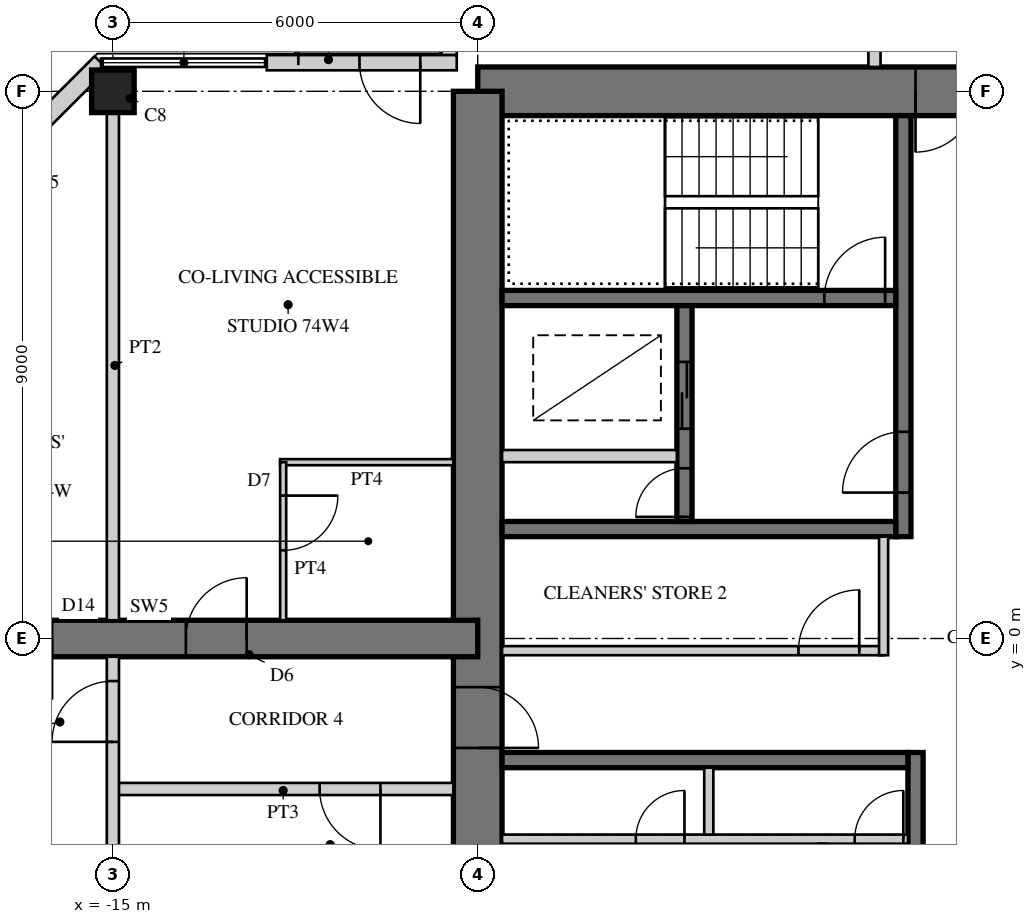
"""IFC4 building model, lengths in metres.
Left out: names, types, materials, properties, quantities, classifications, styles, units other than length and angle.
Written with IfcOpenShell. Run it as: python <this file> out.ifc"""

import sys

from ifc_helpers import new_model, si_unit, direction, frame, frame_2d, origin, origin_2d, place, context, subcontext, project, spatial, rectangle, hollow_rectangle, extrude, element, fill, save


model = new_model("IFC4")
c1 = context("Model", 3, precision=1e-05, world=origin(), true_north=direction((0.0, 1.0)))
c2 = subcontext(c1, "Body", "Model", "MODEL_VIEW")
j1 = project(units=[si_unit("LENGTHUNIT", "METRE"), si_unit("PLANEANGLEUNIT", "RADIAN")], contexts=[c1])
p1 = place(None, origin())
s1 = spatial("IfcSite", under=j1, at=p1, CompositionType="ELEMENT")
p2 = place(p1, origin())
s2 = spatial("IfcBuilding", under=s1, at=p2, CompositionType="ELEMENT")
p3 = place(p2, frame((0.0, 0.0, 284.9)))
s3 = spatial("IfcBuildingStorey", under=s2, at=p3, CompositionType="ELEMENT", Elevation=284.9)
p4 = place(p3, frame((9.0, 9.0, 0.0), z_axis=(0.0, 0.0, 1.0), x_axis=(-1.0, 0.0, 0.0)))
e1 = element("IfcWall", 1, at=p4, inside=s3, PredefinedType="SHEAR", context=c2, shape_type="SweptSolid", body=[
    extrude(rectangle(XDim=18.0, YDim=0.8, at=frame_2d((9.0, 0.0))), origin(), (0.0, 0.0, 1.0), 3.4),
])
p5 = place(p4, frame((9.8, 0.0, 0.0)))
e2 = element("IfcOpeningElement", 2, at=p5, cuts=e1, PredefinedType="OPENING", context=c2, shape_type="SweptSolid", body=[
    extrude(rectangle(XDim=1.0, YDim=2.4, at=frame_2d((0.5, 1.2))), frame((0.0, 0.41, 0.0), z_axis=(0.0, -1.0, 0.0), x_axis=(1.0, 0.0, 0.0)), (0.0, 0.0, 1.0), 0.82),
])
p6 = place(p3, frame((-9.0, 9.0, 0.0), z_axis=(0.0, 0.0, 1.0), x_axis=(0.0, -1.0, 0.0)))
e3 = element("IfcWall", 3, at=p6, inside=s3, PredefinedType="SHEAR", context=c2, shape_type="SweptSolid", body=[
    extrude(rectangle(XDim=18.0, YDim=0.8, at=frame_2d((9.0, 0.0))), origin(), (0.0, 0.0, 1.0), 3.4),
])
p7 = place(p6, frame((9.8, 0.0, 0.0)))
e4 = element("IfcOpeningElement", 4, at=p7, cuts=e3, PredefinedType="OPENING", context=c2, shape_type="SweptSolid", body=[
    extrude(rectangle(XDim=1.0, YDim=2.4, at=frame_2d((0.5, 1.2))), frame((0.0, 0.41, 0.0), z_axis=(0.0, -1.0, 0.0), x_axis=(1.0, 0.0, 0.0)), (0.0, 0.0, 1.0), 0.82),
])
p8 = place(p3, frame((-2.0, 1.675, 0.0), z_axis=(0.0, 0.0, 1.0), x_axis=(0.0, 1.0, 0.0)))
e5 = element("IfcWall", 5, at=p8, inside=s3, PredefinedType="SHEAR", context=c2, shape_type="SweptSolid", body=[
    extrude(rectangle(XDim=6.925, YDim=0.25, at=frame_2d((3.462, 0.0))), origin(), (0.0, 0.0, 1.0), 3.4),
])
p9 = place(p8, frame((0.725, 0.0, 0.0)))
e6 = element("IfcOpeningElement", 6, at=p9, cuts=e5, PredefinedType="OPENING", context=c2, shape_type="SweptSolid", body=[
    extrude(rectangle(XDim=1.0, YDim=2.1, at=frame_2d((0.5, 1.05))), frame((0.0, 0.135, 0.0), z_axis=(0.0, -1.0, 0.0), x_axis=(1.0, 0.0, 0.0)), (0.0, 0.0, 1.0), 0.27),
])
p10 = place(p3, frame((-2.125, 1.8, 0.0), z_axis=(0.0, 0.0, 1.0), x_axis=(-1.0, 0.0, 0.0)))
e7 = element("IfcWall", 7, at=p10, inside=s3, PredefinedType="SHEAR", context=c2, shape_type="SweptSolid", body=[
    extrude(rectangle(XDim=6.475, YDim=0.25, at=frame_2d((3.238, 0.0))), origin(), (0.0, 0.0, 1.0), 3.4),
])
p11 = place(p3, frame((-2.125, 5.6, 0.0), z_axis=(0.0, 0.0, 1.0), x_axis=(-1.0, 0.0, 0.0)))
e8 = element("IfcWall", 8, at=p11, inside=s3, PredefinedType="SHEAR", context=c2, shape_type="SweptSolid", body=[
    extrude(rectangle(XDim=6.475, YDim=0.25, at=frame_2d((3.238, 0.0))), origin(), (0.0, 0.0, 1.0), 3.4),
])
p12 = place(p11, frame((0.175, 0.0, 0.0)))
e9 = element("IfcOpeningElement", 9, at=p12, cuts=e8, PredefinedType="OPENING", context=c2, shape_type="SweptSolid", body=[
    extrude(rectangle(XDim=1.0, YDim=2.1, at=frame_2d((0.5, 1.05))), frame((0.0, 0.135, 0.0), z_axis=(0.0, -1.0, 0.0), x_axis=(1.0, 0.0, 0.0)), (0.0, 0.0, 1.0), 0.27),
])
p13 = place(p3, frame((-5.6, 1.925, 0.0), z_axis=(0.0, 0.0, 1.0), x_axis=(0.0, 1.0, 0.0)))
e10 = element("IfcWall", 10, at=p13, inside=s3, PredefinedType="SHEAR", context=c2, shape_type="SweptSolid", body=[
    extrude(rectangle(XDim=3.55, YDim=0.25, at=frame_2d((1.775, 0.0))), origin(), (0.0, 0.0, 1.0), 3.4),
])
p14 = place(p13, frame((1.525, 0.0, 0.0)))
e11 = element("IfcOpeningElement", 11, at=p14, cuts=e10, PredefinedType="OPENING", context=c2, shape_type="SweptSolid", body=[
    extrude(rectangle(XDim=1.1, YDim=2.2, at=frame_2d((0.55, 1.1))), frame((0.0, 0.135, 0.0), z_axis=(0.0, -1.0, 0.0), x_axis=(1.0, 0.0, 0.0)), (0.0, 0.0, 1.0), 0.27),
])
p15 = place(p13, frame((0.075, 0.0, 0.0)))
e12 = element("IfcOpeningElement", 12, at=p15, cuts=e10, PredefinedType="OPENING", context=c2, shape_type="SweptSolid", body=[
    extrude(rectangle(XDim=0.8, YDim=2.1, at=frame_2d((0.4, 1.05))), frame((0.0, 0.135, 0.0), z_axis=(0.0, -1.0, 0.0), x_axis=(1.0, 0.0, 0.0)), (0.0, 0.0, 1.0), 0.27),
])
p16 = place(p3, frame((-5.725, 3.0, 0.0), z_axis=(0.0, 0.0, 1.0), x_axis=(-1.0, 0.0, 0.0)))
e13 = element("IfcWall", 13, at=p16, inside=s3, PredefinedType="PARTITIONING", context=c2, shape_type="SweptSolid", body=[
    extrude(rectangle(XDim=2.875, YDim=0.2, at=frame_2d((1.438, 0.0))), origin(), (0.0, 0.0, 1.0), 3.4),
])
p17 = place(p3, frame((-1.8, -1.875, 0.0), z_axis=(0.0, 0.0, 1.0), x_axis=(0.0, -1.0, 0.0)))
e14 = element("IfcWall", 14, at=p17, inside=s3, PredefinedType="SHEAR", context=c2, shape_type="SweptSolid", body=[
    extrude(rectangle(XDim=6.725, YDim=0.25, at=frame_2d((3.363, 0.0))), origin(), (0.0, 0.0, 1.0), 3.4),
])
p18 = place(p17, frame((1.875, 0.0, 0.0)))
e15 = element("IfcOpeningElement", 15, at=p18, cuts=e14, PredefinedType="OPENING", context=c2, shape_type="SweptSolid", body=[
    extrude(rectangle(XDim=1.6, YDim=2.4, at=frame_2d((0.8, 1.2))), frame((0.0, 0.135, 0.0), z_axis=(0.0, -1.0, 0.0), x_axis=(1.0, 0.0, 0.0)), (0.0, 0.0, 1.0), 0.27),
])
p19 = place(p3, frame((-1.925, -2.0, 0.0), z_axis=(0.0, 0.0, 1.0), x_axis=(-1.0, 0.0, 0.0)))
e16 = element("IfcWall", 16, at=p19, inside=s3, PredefinedType="SHEAR", context=c2, shape_type="SweptSolid", body=[
    extrude(rectangle(XDim=6.675, YDim=0.25, at=frame_2d((3.337, 0.0))), origin(), (0.0, 0.0, 1.0), 3.4),
])
p20 = place(p3, frame((-1.925, -3.3, 0.0), z_axis=(0.0, 0.0, 1.0), x_axis=(-1.0, 0.0, 0.0)))
e17 = element("IfcWall", 17, at=p20, inside=s3, PredefinedType="PARTITIONING", context=c2, shape_type="SweptSolid", body=[
    extrude(rectangle(XDim=6.675, YDim=0.15, at=frame_2d((3.337, 0.0))), origin(), (0.0, 0.0, 1.0), 3.4),
])
p21 = place(p20, frame((0.075, 0.0, 0.0)))
e18 = element("IfcOpeningElement", 18, at=p21, cuts=e17, PredefinedType="OPENING", context=c2, shape_type="SweptSolid", body=[
    extrude(rectangle(XDim=0.8, YDim=2.1, at=frame_2d((0.4, 1.05))), frame((0.0, 0.085, 0.0), z_axis=(0.0, -1.0, 0.0), x_axis=(1.0, 0.0, 0.0)), (0.0, 0.0, 1.0), 0.17),
])
p22 = place(p20, frame((3.675, 0.0, 0.0)))
e19 = element("IfcOpeningElement", 19, at=p22, cuts=e17, PredefinedType="OPENING", context=c2, shape_type="SweptSolid", body=[
    extrude(rectangle(XDim=0.8, YDim=2.1, at=frame_2d((0.4, 1.05))), frame((0.0, 0.085, 0.0), z_axis=(0.0, -1.0, 0.0), x_axis=(1.0, 0.0, 0.0)), (0.0, 0.0, 1.0), 0.17),
])
p23 = place(p3, frame((-5.2, -2.125, 0.0), z_axis=(0.0, 0.0, 1.0), x_axis=(0.0, -1.0, 0.0)))
e20 = element("IfcWall", 20, at=p23, inside=s3, PredefinedType="PARTITIONING", context=c2, shape_type="SweptSolid", body=[
    extrude(rectangle(XDim=1.1, YDim=0.15, at=frame_2d((0.55, 0.0))), origin(), (0.0, 0.0, 1.0), 3.4),
])
p24 = place(p3, frame((-9.0, 0.0, 0.0), z_axis=(0.0, 0.0, 1.0), x_axis=(-1.0, 0.0, 0.0)))
e21 = element("IfcWall", 21, at=p24, inside=s3, PredefinedType="SHEAR", context=c2, shape_type="SweptSolid", body=[
    extrude(rectangle(XDim=9.0, YDim=0.6, at=frame_2d((4.5, 0.0))), origin(), (0.0, 0.0, 1.0), 3.4),
])
p25 = place(p24, frame((3.8, 0.0, 0.0)))
e22 = element("IfcOpeningElement", 22, at=p25, cuts=e21, PredefinedType="OPENING", context=c2, shape_type="SweptSolid", body=[
    extrude(rectangle(XDim=1.0, YDim=2.15, at=frame_2d((0.5, 1.075))), frame((0.0, 0.31, 0.0), z_axis=(0.0, -1.0, 0.0), x_axis=(1.0, 0.0, 0.0)), (0.0, 0.0, 1.0), 0.62),
])
p26 = place(p24, frame((7.0, 0.0, 0.0)))
e23 = element("IfcOpeningElement", 23, at=p26, cuts=e21, PredefinedType="OPENING", context=c2, shape_type="SweptSolid", body=[
    extrude(rectangle(XDim=1.0, YDim=2.2, at=frame_2d((0.5, 1.1))), frame((0.0, 0.31, 0.0), z_axis=(0.0, -1.0, 0.0), x_axis=(1.0, 0.0, 0.0)), (0.0, 0.0, 1.0), 0.62),
])
p27 = place(p3, frame((-15.0, 9.0, 0.0), z_axis=(0.0, 0.0, 1.0), x_axis=(1.0, 0.0, 0.0)))
e24 = element("IfcColumn", 24, at=p27, inside=s3, PredefinedType="COLUMN", context=c2, shape_type="SweptSolid", body=[
    extrude(rectangle(XDim=0.7, YDim=0.7, at=origin_2d()), origin(), (0.0, 0.0, 1.0), 3.4),
])
p28 = place(p3, frame((-9.47, 12.47, 0.0), z_axis=(0.0, 0.0, 1.0), x_axis=(0.0, -1.0, 0.0)))
e25 = element("IfcWall", 25, at=p28, inside=s3, PredefinedType="SOLIDWALL", context=c2, shape_type="SweptSolid", body=[
    extrude(rectangle(XDim=2.875, YDim=0.25, at=frame_2d((1.438, 0.0))), origin(), (0.0, 0.0, 1.0), 3.2),
])
p29 = place(p28, frame((0.6, 0.0, 0.0)))
e26 = element("IfcOpeningElement", 26, at=p29, cuts=e25, PredefinedType="OPENING", context=c2, shape_type="SweptSolid", body=[
    extrude(rectangle(XDim=1.0, YDim=2.2, at=frame_2d((0.5, 1.1))), frame((0.0, 0.135, 0.0), z_axis=(0.0, -1.0, 0.0), x_axis=(1.0, 0.0, 0.0)), (0.0, 0.0, 1.0), 0.27),
])
p30 = place(p3, frame((-9.345, 9.47, 0.0), z_axis=(0.0, 0.0, 1.0), x_axis=(-1.0, 0.0, 0.0)))
e27 = element("IfcWall", 27, at=p30, inside=s3, PredefinedType="SOLIDWALL", context=c2, shape_type="SweptSolid", body=[
    extrude(rectangle(XDim=3.125, YDim=0.25, at=frame_2d((1.562, 0.0))), origin(), (0.0, 0.0, 1.0), 3.2),
])
p31 = place(p30, frame((0.6, 0.0, 0.0)))
e28 = element("IfcOpeningElement", 28, at=p31, cuts=e27, PredefinedType="OPENING", context=c2, shape_type="SweptSolid", body=[
    extrude(rectangle(XDim=1.0, YDim=2.2, at=frame_2d((0.5, 1.1))), frame((0.0, 0.135, 0.0), z_axis=(0.0, -1.0, 0.0), x_axis=(1.0, 0.0, 0.0)), (0.0, 0.0, 1.0), 0.27),
])
p32 = place(p3, frame((-15.195, 9.47, 0.0), z_axis=(0.0, 0.0, 1.0), x_axis=(-0.707106781187, -0.707106781187, 0.0)))
e29 = element("IfcWall", 29, at=p32, inside=s3, PredefinedType="SOLIDWALL", context=c2, shape_type="SweptSolid", body=[
    extrude(rectangle(XDim=4.632, YDim=0.3, at=frame_2d((2.316, 0.0))), origin(), (0.0, 0.0, 1.0), 3.2),
])
p33 = place(p32, frame((1.866, 0.0, 0.3)))
e30 = element("IfcOpeningElement", 30, at=p33, cuts=e29, PredefinedType="OPENING", context=c2, shape_type="SweptSolid", body=[
    extrude(rectangle(XDim=0.9, YDim=2.4, at=frame_2d((0.45, 1.2))), frame((0.0, 0.16, 0.0), z_axis=(0.0, -1.0, 0.0), x_axis=(1.0, 0.0, 0.0)), (0.0, 0.0, 1.0), 0.32),
])
p34 = place(p3, frame((-2.325, -0.2, 0.0), z_axis=(0.0, 0.0, 1.0), x_axis=(-1.0, 0.0, 0.0)))
e31 = element("IfcWall", 31, at=p34, inside=s3, PredefinedType="PARTITIONING", context=c2, shape_type="SweptSolid", body=[
    extrude(rectangle(XDim=6.275, YDim=0.15, at=frame_2d((3.138, 0.0))), origin(), (0.0, 0.0, 1.0), 3.2),
])
p35 = place(p34, frame((0.4, 0.0, 0.0)))
e32 = element("IfcOpeningElement", 32, at=p35, cuts=e31, PredefinedType="OPENING", context=c2, shape_type="SweptSolid", body=[
    extrude(rectangle(XDim=1.0, YDim=2.1, at=frame_2d((0.5, 1.05))), frame((0.0, 0.085, 0.0), z_axis=(0.0, -1.0, 0.0), x_axis=(1.0, 0.0, 0.0)), (0.0, 0.0, 1.0), 0.17),
])
p36 = place(p3, frame((-2.325, 1.675, 0.0), z_axis=(0.0, 0.0, 1.0), x_axis=(0.0, -1.0, 0.0)))
e33 = element("IfcWall", 33, at=p36, inside=s3, PredefinedType="PARTITIONING", context=c2, shape_type="SweptSolid", body=[
    extrude(rectangle(XDim=1.95, YDim=0.15, at=frame_2d((0.975, 0.0))), origin(), (0.0, 0.0, 1.0), 3.2),
])
p37 = place(p3, frame((-2.475, 9.4, 0.0), z_axis=(0.0, 0.0, 1.0), x_axis=(0.0, 1.0, 0.0)))
e34 = element("IfcWall", 34, at=p37, inside=s3, PredefinedType="SOLIDWALL", context=c2, shape_type="SweptSolid", body=[
    extrude(rectangle(XDim=5.6, YDim=0.2, at=frame_2d((2.8, 0.0))), origin(), (0.0, 0.0, 1.0), 3.2),
])
p38 = place(p37, frame((1.2, 0.0, 0.0)))
e35 = element("IfcOpeningElement", 35, at=p38, cuts=e34, PredefinedType="OPENING", context=c2, shape_type="SweptSolid", body=[
    extrude(rectangle(XDim=1.0, YDim=2.2, at=frame_2d((0.5, 1.1))), frame((0.0, 0.11, 0.0), z_axis=(0.0, -1.0, 0.0), x_axis=(1.0, 0.0, 0.0)), (0.0, 0.0, 1.0), 0.22),
])
p39 = place(p3, frame((-9.4, 2.9, 0.0), z_axis=(0.0, 0.0, 1.0), x_axis=(-1.0, 0.0, 0.0)))
e36 = element("IfcWall", 36, at=p39, inside=s3, PredefinedType="PARTITIONING", context=c2, shape_type="SweptSolid", body=[
    extrude(rectangle(XDim=2.85, YDim=0.1, at=frame_2d((1.425, 0.0))), origin(), (0.0, 0.0, 1.0), 3.2),
])
p40 = place(p3, frame((-12.2, 2.9, 0.0), z_axis=(0.0, 0.0, 1.0), x_axis=(0.0, -1.0, 0.0)))
e37 = element("IfcWall", 37, at=p40, inside=s3, PredefinedType="PARTITIONING", context=c2, shape_type="SweptSolid", body=[
    extrude(rectangle(XDim=2.6, YDim=0.1, at=frame_2d((1.3, 0.0))), origin(), (0.0, 0.0, 1.0), 3.2),
])
p41 = place(p40, frame((0.55, 0.0, 0.0)))
e38 = element("IfcOpeningElement", 38, at=p41, cuts=e37, PredefinedType="OPENING", context=c2, shape_type="SweptSolid", body=[
    extrude(rectangle(XDim=0.9, YDim=2.1, at=frame_2d((0.45, 1.05))), frame((0.0, 0.06, 0.0), z_axis=(0.0, -1.0, 0.0), x_axis=(1.0, 0.0, 0.0)), (0.0, 0.0, 1.0), 0.12),
])
p42 = place(p3, frame((-9.4, -2.475, 0.0), z_axis=(0.0, 0.0, 1.0), x_axis=(-1.0, 0.0, 0.0)))
e39 = element("IfcWall", 39, at=p42, inside=s3, PredefinedType="SOLIDWALL", context=c2, shape_type="SweptSolid", body=[
    extrude(rectangle(XDim=5.6, YDim=0.2, at=frame_2d((2.8, 0.0))), origin(), (0.0, 0.0, 1.0), 3.2),
])
p43 = place(p42, frame((1.2, 0.0, 0.0)))
e40 = element("IfcOpeningElement", 40, at=p43, cuts=e39, PredefinedType="OPENING", context=c2, shape_type="SweptSolid", body=[
    extrude(rectangle(XDim=1.0, YDim=2.2, at=frame_2d((0.5, 1.1))), frame((0.0, 0.11, 0.0), z_axis=(0.0, -1.0, 0.0), x_axis=(1.0, 0.0, 0.0)), (0.0, 0.0, 1.0), 0.22),
])
p44 = place(p3, frame((-15.0, 8.65, 0.0), z_axis=(0.0, 0.0, 1.0), x_axis=(0.0, -1.0, 0.0)))
e41 = element("IfcWall", 41, at=p44, inside=s3, PredefinedType="SOLIDWALL", context=c2, shape_type="SweptSolid", body=[
    extrude(rectangle(XDim=8.35, YDim=0.2, at=frame_2d((4.175, 0.0))), origin(), (0.0, 0.0, 1.0), 2.5),
])
p45 = place(p3, frame((-15.0, -0.3, 0.0), z_axis=(0.0, 0.0, 1.0), x_axis=(0.0, -1.0, 0.0)))
e42 = element("IfcWall", 42, at=p45, inside=s3, PredefinedType="SOLIDWALL", context=c2, shape_type="SweptSolid", body=[
    extrude(rectangle(XDim=8.35, YDim=0.2, at=frame_2d((4.175, 0.0))), origin(), (0.0, 0.0, 1.0), 2.5),
])
p46 = place(p45, frame((0.4, 0.0, 0.0)))
e43 = element("IfcOpeningElement", 43, at=p46, cuts=e42, PredefinedType="OPENING", context=c2, shape_type="SweptSolid", body=[
    extrude(rectangle(XDim=1.0, YDim=2.2, at=frame_2d((0.5, 1.1))), frame((0.0, 0.11, 0.0), z_axis=(0.0, -1.0, 0.0), x_axis=(1.0, 0.0, 0.0)), (0.0, 0.0, 1.0), 0.22),
])
p47 = place(p31, origin())
e44 = element("IfcDoor", 44, at=p47, inside=s3, OperationType="SINGLE_SWING_LEFT", PredefinedType="DOOR", context=c2, shape_type="SweptSolid", body=[
    extrude(hollow_rectangle(XDim=1.0, YDim=2.2, WallThickness=0.06, at=frame_2d((0.5, 1.1))), frame((0.0, 0.025, 0.0), z_axis=(0.0, -1.0, 0.0), x_axis=(1.0, 0.0, 0.0)), (0.0, 0.0, 1.0), 0.05),
    extrude(rectangle(XDim=0.879, YDim=2.079, at=frame_2d((0.5, 1.1))), frame((0.0, 0.025, 0.0), z_axis=(0.0, -1.0, 0.0), x_axis=(1.0, 0.0, 0.0)), (0.0, 0.0, 1.0), 0.05),
])
fill(e28, e44)
p48 = place(p35, frame((1.0, 0.0, 0.0), z_axis=(0.0, 0.0, 1.0), x_axis=(-1.0, 0.0, 0.0)))
e45 = element("IfcDoor", 45, at=p48, inside=s3, OperationType="SINGLE_SWING_RIGHT", PredefinedType="DOOR", context=c2, shape_type="SweptSolid", body=[
    extrude(rectangle(XDim=1.0, YDim=2.1, at=frame_2d((0.5, 1.05))), frame((0.0, 0.025, 0.0), z_axis=(0.0, -1.0, 0.0), x_axis=(1.0, 0.0, 0.0)), (0.0, 0.0, 1.0), 0.05),
])
fill(e32, e45)
p49 = place(p41, origin())
e46 = element("IfcDoor", 46, at=p49, inside=s3, OperationType="SINGLE_SWING_LEFT", PredefinedType="DOOR", context=c2, shape_type="SweptSolid", body=[
    extrude(rectangle(XDim=0.9, YDim=2.1, at=frame_2d((0.45, 1.05))), frame((0.0, 0.025, 0.0), z_axis=(0.0, -1.0, 0.0), x_axis=(1.0, 0.0, 0.0)), (0.0, 0.0, 1.0), 0.05),
])
fill(e38, e46)
p50 = place(p43, origin())
e47 = element("IfcDoor", 47, at=p50, inside=s3, OperationType="SINGLE_SWING_LEFT", PredefinedType="DOOR", context=c2, shape_type="SweptSolid", body=[
    extrude(rectangle(XDim=1.0, YDim=2.2, at=frame_2d((0.5, 1.1))), frame((0.0, 0.025, 0.0), z_axis=(0.0, -1.0, 0.0), x_axis=(1.0, 0.0, 0.0)), (0.0, 0.0, 1.0), 0.05),
])
fill(e40, e47)
p51 = place(p46, frame((1.0, 0.0, 0.0), z_axis=(0.0, 0.0, 1.0), x_axis=(-1.0, 0.0, 0.0)))
e48 = element("IfcDoor", 48, at=p51, inside=s3, OperationType="SINGLE_SWING_LEFT", PredefinedType="DOOR", context=c2, shape_type="SweptSolid", body=[
    extrude(rectangle(XDim=1.0, YDim=2.2, at=frame_2d((0.5, 1.1))), frame((0.0, 0.025, 0.0), z_axis=(0.0, -1.0, 0.0), x_axis=(1.0, 0.0, 0.0)), (0.0, 0.0, 1.0), 0.05),
])
fill(e43, e48)
p52 = place(p25, frame((1.0, 0.0, 0.0), z_axis=(0.0, 0.0, 1.0), x_axis=(-1.0, 0.0, 0.0)))
e49 = element("IfcDoor", 49, at=p52, inside=s3, OperationType="SINGLE_SWING_RIGHT", PredefinedType="DOOR", context=c2, shape_type="SweptSolid", body=[
    extrude(rectangle(XDim=1.0, YDim=2.15, at=frame_2d((0.5, 1.075))), frame((0.0, 0.025, 0.0), z_axis=(0.0, -1.0, 0.0), x_axis=(1.0, 0.0, 0.0)), (0.0, 0.0, 1.0), 0.05),
])
fill(e22, e49)
p53 = place(p5, origin())
e50 = element("IfcDoor", 50, at=p53, inside=s3, OperationType="SINGLE_SWING_RIGHT", PredefinedType="DOOR", context=c2, shape_type="SweptSolid", body=[
    extrude(rectangle(XDim=1.0, YDim=2.4, at=frame_2d((0.5, 1.2))), frame((0.0, 0.055, 0.0), z_axis=(0.0, -1.0, 0.0), x_axis=(1.0, 0.0, 0.0)), (0.0, 0.0, 1.0), 0.05),
])
fill(e2, e50)
p54 = place(p7, origin())
e51 = element("IfcDoor", 51, at=p54, inside=s3, OperationType="SINGLE_SWING_RIGHT", PredefinedType="DOOR", context=c2, shape_type="SweptSolid", body=[
    extrude(rectangle(XDim=1.0, YDim=2.4, at=frame_2d((0.5, 1.2))), frame((0.0, 0.055, 0.0), z_axis=(0.0, -1.0, 0.0), x_axis=(1.0, 0.0, 0.0)), (0.0, 0.0, 1.0), 0.05),
])
fill(e4, e51)
p55 = place(p9, origin())
e52 = element("IfcDoor", 52, at=p55, inside=s3, OperationType="SINGLE_SWING_LEFT", PredefinedType="DOOR", context=c2, shape_type="SweptSolid", body=[
    extrude(rectangle(XDim=1.0, YDim=2.1, at=frame_2d((0.5, 1.05))), frame((0.0, 0.025, 0.0), z_axis=(0.0, -1.0, 0.0), x_axis=(1.0, 0.0, 0.0)), (0.0, 0.0, 1.0), 0.05),
])
fill(e6, e52)
p56 = place(p12, frame((1.0, 0.0, 0.0), z_axis=(0.0, 0.0, 1.0), x_axis=(-1.0, 0.0, 0.0)))
e53 = element("IfcDoor", 53, at=p56, inside=s3, OperationType="SINGLE_SWING_RIGHT", PredefinedType="DOOR", context=c2, shape_type="SweptSolid", body=[
    extrude(rectangle(XDim=1.0, YDim=2.1, at=frame_2d((0.5, 1.05))), frame((0.0, 0.025, 0.0), z_axis=(0.0, -1.0, 0.0), x_axis=(1.0, 0.0, 0.0)), (0.0, 0.0, 1.0), 0.05),
])
fill(e9, e53)
p57 = place(p14, origin())
e54 = element("IfcDoor", 54, at=p57, inside=s3, OperationType="DOUBLE_DOOR_SLIDING", PredefinedType="DOOR", context=c2, shape_type="SweptSolid", body=[
    extrude(rectangle(XDim=1.1, YDim=2.2, at=frame_2d((0.55, 1.1))), frame((0.0, 0.025, 0.0), z_axis=(0.0, -1.0, 0.0), x_axis=(1.0, 0.0, 0.0)), (0.0, 0.0, 1.0), 0.05),
])
fill(e11, e54)
p58 = place(p15, origin())
e55 = element("IfcDoor", 55, at=p58, inside=s3, OperationType="SINGLE_SWING_LEFT", PredefinedType="DOOR", context=c2, shape_type="SweptSolid", body=[
    extrude(rectangle(XDim=0.8, YDim=2.1, at=frame_2d((0.4, 1.05))), frame((0.0, 0.025, 0.0), z_axis=(0.0, -1.0, 0.0), x_axis=(1.0, 0.0, 0.0)), (0.0, 0.0, 1.0), 0.05),
])
fill(e12, e55)
p59 = place(p21, frame((0.8, 0.0, 0.0), z_axis=(0.0, 0.0, 1.0), x_axis=(-1.0, 0.0, 0.0)))
e56 = element("IfcDoor", 56, at=p59, inside=s3, OperationType="SINGLE_SWING_RIGHT", PredefinedType="DOOR", context=c2, shape_type="SweptSolid", body=[
    extrude(rectangle(XDim=0.8, YDim=2.1, at=frame_2d((0.4, 1.05))), frame((0.0, 0.025, 0.0), z_axis=(0.0, -1.0, 0.0), x_axis=(1.0, 0.0, 0.0)), (0.0, 0.0, 1.0), 0.05),
])
fill(e18, e56)
p60 = place(p22, frame((0.8, 0.0, 0.0), z_axis=(0.0, 0.0, 1.0), x_axis=(-1.0, 0.0, 0.0)))
e57 = element("IfcDoor", 57, at=p60, inside=s3, OperationType="SINGLE_SWING_RIGHT", PredefinedType="DOOR", context=c2, shape_type="SweptSolid", body=[
    extrude(rectangle(XDim=0.8, YDim=2.1, at=frame_2d((0.4, 1.05))), frame((0.0, 0.025, 0.0), z_axis=(0.0, -1.0, 0.0), x_axis=(1.0, 0.0, 0.0)), (0.0, 0.0, 1.0), 0.05),
])
fill(e19, e57)
save(model, sys.argv[1])
